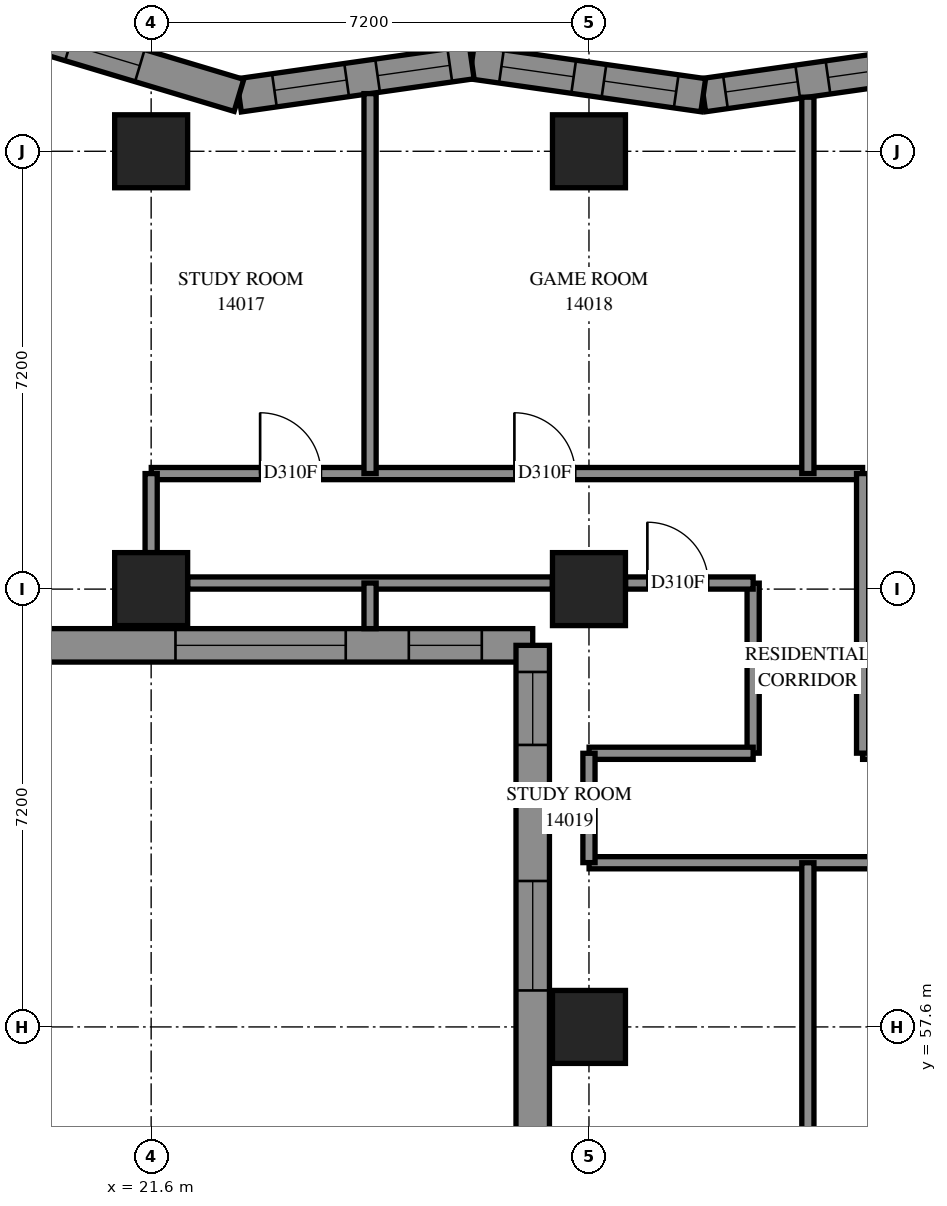
"""IFC4 building model, lengths in metres.
Left out: names, types, materials, properties, quantities, classifications, styles, units other than length and angle.
Written with IfcOpenShell. Run it as: python <this file> out.ifc"""

import sys

from ifc_helpers import new_model, si_unit, direction, frame, frame_2d, origin, origin_2d, place, context, subcontext, project, spatial, polyline, rectangle, outline, extrude, element, fill, save


model = new_model("IFC4")
c1 = context("Model", 3, precision=1e-05, world=origin(), true_north=direction((0.0, 1.0)))
c2 = subcontext(c1, "Body", "Model", "MODEL_VIEW")
j1 = project(units=[si_unit("LENGTHUNIT", "METRE"), si_unit("PLANEANGLEUNIT", "RADIAN")], contexts=[c1])
p1 = place(None, origin())
s1 = spatial("IfcSite", under=j1, at=p1, CompositionType="ELEMENT")
p2 = place(p1, origin())
s2 = spatial("IfcBuilding", under=s1, at=p2, CompositionType="ELEMENT")
p3 = place(p2, frame((0.0, 0.0, 54.2)))
s3 = spatial("IfcBuildingStorey", under=s2, at=p3, CompositionType="ELEMENT", Elevation=54.2)
for number, where, z_axis, x_axis in (
    (1, (21.6, 64.8, 0.0), (0.0, 0.0, 1.0), (1.0, 0.0, 0.0)),
    (2, (21.6, 72.0, 0.0), (0.0, 0.0, 1.0), (1.0, 0.0, 0.0)),
    (3, (28.8, 57.6, 0.0), (0.0, 0.0, 1.0), (1.0, 0.0, 0.0)),
    (4, (28.8, 64.8, 0.0), (0.0, 0.0, 1.0), (1.0, 0.0, 0.0)),
    (5, (28.8, 72.0, 0.0), (0.0, 0.0, 1.0), (1.0, 0.0, 0.0)),
):
    element("IfcColumn", number, at=place(p3, frame(where, z_axis=z_axis, x_axis=x_axis)), inside=s3, PredefinedType="COLUMN", context=c2, shape_type="SweptSolid", body=[
        extrude(rectangle(XDim=1.2, YDim=1.2, at=origin_2d()), origin(), (0.0, 0.0, 1.0), 3.1),
    ])
p4 = place(p3, frame((34.486, 73.464, 0.0), z_axis=(0.0, 0.0, 1.0), x_axis=(-0.990016994, -0.1409480459, 0.0)))
e6 = element("IfcWall", 6, at=p4, inside=s3, PredefinedType="SOLIDWALL", context=c2, shape_type="SweptSolid", body=[
    extrude(outline(polyline([(-0.039, -0.275), (3.806, -0.275), (3.885, 0.275), (0.039, 0.275), (-0.039, -0.275)])), origin(), (0.0, 0.0, 1.0), 3.1),
])
p5 = place(p4, frame((0.573, 0.0, 0.5)))
e7 = element("IfcOpeningElement", 7, at=p5, cuts=e6, PredefinedType="OPENING", context=c2, shape_type="SweptSolid", body=[
    extrude(rectangle(XDim=1.2, YDim=2.45, at=frame_2d((0.6, 1.225))), frame((0.0, 0.285, 0.0), z_axis=(0.0, -1.0, 0.0), x_axis=(1.0, 0.0, 0.0)), (0.0, 0.0, 1.0), 0.57),
])
p6 = place(p4, frame((2.276, 0.0, 0.5)))
e8 = element("IfcOpeningElement", 8, at=p6, cuts=e6, PredefinedType="OPENING", context=c2, shape_type="SweptSolid", body=[
    extrude(rectangle(XDim=1.2, YDim=2.45, at=frame_2d((0.6, 1.225))), frame((0.0, 0.285, 0.0), z_axis=(0.0, -1.0, 0.0), x_axis=(1.0, 0.0, 0.0)), (0.0, 0.0, 1.0), 0.57),
])
p7 = place(p3, frame((30.679, 72.922, 0.0), z_axis=(0.0, 0.0, 1.0), x_axis=(-0.990016994, 0.1409480459, 0.0)))
e9 = element("IfcWall", 9, at=p7, inside=s3, PredefinedType="SOLIDWALL", context=c2, shape_type="SweptSolid", body=[
    extrude(outline(polyline([(0.039, -0.275), (3.885, -0.275), (3.806, 0.275), (-0.039, 0.275), (0.039, -0.275)])), origin(), (0.0, 0.0, 1.0), 3.1),
])
p8 = place(p7, frame((0.449, 0.0, 0.5)))
e10 = element("IfcOpeningElement", 10, at=p8, cuts=e9, PredefinedType="OPENING", context=c2, shape_type="SweptSolid", body=[
    extrude(rectangle(XDim=1.2, YDim=2.45, at=frame_2d((0.6, 1.225))), frame((0.0, 0.285, 0.0), z_axis=(0.0, -1.0, 0.0), x_axis=(1.0, 0.0, 0.0)), (0.0, 0.0, 1.0), 0.57),
])
p9 = place(p7, frame((2.152, 0.0, 0.5)))
e11 = element("IfcOpeningElement", 11, at=p9, cuts=e9, PredefinedType="OPENING", context=c2, shape_type="SweptSolid", body=[
    extrude(rectangle(XDim=1.2, YDim=2.45, at=frame_2d((0.6, 1.225))), frame((0.0, 0.285, 0.0), z_axis=(0.0, -1.0, 0.0), x_axis=(1.0, 0.0, 0.0)), (0.0, 0.0, 1.0), 0.57),
])
p10 = place(p3, frame((26.872, 73.464, 0.0), z_axis=(0.0, 0.0, 1.0), x_axis=(-0.9900171381, -0.1409470338, 0.0)))
e12 = element("IfcWall", 12, at=p10, inside=s3, PredefinedType="SOLIDWALL", context=c2, shape_type="SweptSolid", body=[
    extrude(outline(polyline([(-0.039, -0.275), (3.806, -0.275), (3.927, 0.275), (0.039, 0.275), (-0.039, -0.275)])), origin(), (0.0, 0.0, 1.0), 3.1),
])
p11 = place(p10, frame((0.364, 0.0, 0.5)))
e13 = element("IfcOpeningElement", 13, at=p11, cuts=e12, PredefinedType="OPENING", context=c2, shape_type="SweptSolid", body=[
    extrude(rectangle(XDim=1.2, YDim=2.45, at=frame_2d((0.6, 1.225))), frame((0.0, 0.285, 0.0), z_axis=(0.0, -1.0, 0.0), x_axis=(1.0, 0.0, 0.0)), (0.0, 0.0, 1.0), 0.57),
])
p12 = place(p10, frame((2.078, 0.0, 0.5)))
e14 = element("IfcOpeningElement", 14, at=p12, cuts=e12, PredefinedType="OPENING", context=c2, shape_type="SweptSolid", body=[
    extrude(rectangle(XDim=1.2, YDim=2.45, at=frame_2d((0.6, 1.225))), frame((0.0, 0.285, 0.0), z_axis=(0.0, -1.0, 0.0), x_axis=(1.0, 0.0, 0.0)), (0.0, 0.0, 1.0), 0.57),
])
p13 = place(p3, frame((23.044, 72.919, 0.0), z_axis=(0.0, 0.0, 1.0), x_axis=(-0.9578315412, 0.2873303652, 0.0)))
e15 = element("IfcWall", 15, at=p13, inside=s3, PredefinedType="SOLIDWALL", context=c2, shape_type="SweptSolid", body=[
    extrude(outline(polyline([(0.06, -0.275), (4.035, -0.275), (3.296, 0.275), (-0.06, 0.275), (0.06, -0.275)])), origin(), (0.0, 0.0, 1.0), 3.1),
])
p14 = place(p13, frame((1.702, 0.0, 0.5)))
e16 = element("IfcOpeningElement", 16, at=p14, cuts=e15, PredefinedType="OPENING", context=c2, shape_type="SweptSolid", body=[
    extrude(rectangle(XDim=1.2, YDim=2.45, at=frame_2d((0.6, 1.225))), frame((0.0, 0.285, 0.0), z_axis=(0.0, -1.0, 0.0), x_axis=(1.0, 0.0, 0.0)), (0.0, 0.0, 1.0), 0.57),
])
p15 = place(p3, frame((19.533, 63.875, 0.0), z_axis=(0.0, 0.0, 1.0), x_axis=(1.0, 0.0, 0.0)))
e17 = element("IfcWall", 17, at=p15, inside=s3, PredefinedType="SOLIDWALL", context=c2, shape_type="SweptSolid", body=[
    extrude(outline(polyline([(-0.275, -0.275), (8.067, -0.275), (8.617, 0.275), (0.275, 0.275), (-0.275, -0.275)])), origin(), (0.0, 0.0, 1.0), 3.1),
])
p16 = place(p15, frame((2.467, 0.0, 0.5)))
e18 = element("IfcOpeningElement", 18, at=p16, cuts=e17, PredefinedType="OPENING", context=c2, shape_type="SweptSolid", body=[
    extrude(rectangle(XDim=2.8, YDim=2.45, at=frame_2d((1.4, 1.225))), frame((0.0, 0.285, 0.0), z_axis=(0.0, -1.0, 0.0), x_axis=(1.0, 0.0, 0.0)), (0.0, 0.0, 1.0), 0.57),
])
p17 = place(p15, frame((6.304, 0.0, 0.5)))
e19 = element("IfcOpeningElement", 19, at=p17, cuts=e17, PredefinedType="OPENING", context=c2, shape_type="SweptSolid", body=[
    extrude(rectangle(XDim=1.2, YDim=2.45, at=frame_2d((0.6, 1.225))), frame((0.0, 0.285, 0.0), z_axis=(0.0, -1.0, 0.0), x_axis=(1.0, 0.0, 0.0)), (0.0, 0.0, 1.0), 0.57),
])
p18 = place(p3, frame((27.875, 63.875, 0.0), z_axis=(0.0, 0.0, 1.0), x_axis=(0.0, -1.0, 0.0)))
e20 = element("IfcWall", 20, at=p18, inside=s3, PredefinedType="SOLIDWALL", context=c2, shape_type="SweptSolid", body=[
    extrude(outline(polyline([(0.275, -0.275), (8.617, -0.275), (8.067, 0.275), (-0.275, 0.275), (0.275, -0.275)])), origin(), (0.0, 0.0, 1.0), 3.1),
])
p19 = place(p18, frame((0.438, 0.0, 0.5)))
e21 = element("IfcOpeningElement", 21, at=p19, cuts=e20, PredefinedType="OPENING", context=c2, shape_type="SweptSolid", body=[
    extrude(rectangle(XDim=1.2, YDim=2.45, at=frame_2d((0.6, 1.225))), frame((0.0, 0.285, 0.0), z_axis=(0.0, -1.0, 0.0), x_axis=(1.0, 0.0, 0.0)), (0.0, 0.0, 1.0), 0.57),
])
p20 = place(p18, frame((3.875, 0.0, 0.7)))
e22 = element("IfcOpeningElement", 22, at=p20, cuts=e20, PredefinedType="OPENING", context=c2, shape_type="SweptSolid", body=[
    extrude(rectangle(XDim=1.8, YDim=2.2, at=frame_2d((0.9, 1.1))), frame((0.0, 0.285, 0.0), z_axis=(0.0, -1.0, 0.0), x_axis=(1.0, 0.0, 0.0)), (0.0, 0.0, 1.0), 0.57),
])
p21 = place(p3, frame((28.802, 60.3, 0.0), z_axis=(0.0, 0.0, 1.0), x_axis=(1.0, 0.0, 0.0)))
e23 = element("IfcWall", 23, at=p21, inside=s3, PredefinedType="PARTITIONING", context=c2, shape_type="SweptSolid", body=[
    extrude(rectangle(XDim=24.108, YDim=0.2, at=frame_2d((12.054, 0.0))), origin(), (0.0, 0.0, 1.0), 3.1),
])
p22 = place(p21, frame((11.323, 0.0, 0.0)))
e24 = element("IfcOpeningElement", 24, at=p22, cuts=e23, PredefinedType="OPENING", context=c2, shape_type="SweptSolid", body=[
    extrude(rectangle(XDim=1.0, YDim=2.1, at=frame_2d((0.5, 1.05))), frame((0.0, 0.11, 0.0), z_axis=(0.0, -1.0, 0.0), x_axis=(1.0, 0.0, 0.0)), (0.0, 0.0, 1.0), 0.22),
])
p23 = place(p21, frame((14.798, 0.0, 0.0)))
e25 = element("IfcOpeningElement", 25, at=p23, cuts=e23, PredefinedType="OPENING", context=c2, shape_type="SweptSolid", body=[
    extrude(rectangle(XDim=0.9, YDim=2.1, at=frame_2d((0.45, 1.05))), frame((0.0, 0.11, 0.0), z_axis=(0.0, -1.0, 0.0), x_axis=(1.0, 0.0, 0.0)), (0.0, 0.0, 1.0), 0.22),
])
p24 = place(p21, frame((18.833, 0.0, 0.0)))
e26 = element("IfcOpeningElement", 26, at=p24, cuts=e23, PredefinedType="OPENING", context=c2, shape_type="SweptSolid", body=[
    extrude(rectangle(XDim=1.0, YDim=2.1, at=frame_2d((0.5, 1.05))), frame((0.0, 0.11, 0.0), z_axis=(0.0, -1.0, 0.0), x_axis=(1.0, 0.0, 0.0)), (0.0, 0.0, 1.0), 0.22),
])
p25 = place(p21, frame((22.839, 0.0, 0.0)))
e27 = element("IfcOpeningElement", 27, at=p25, cuts=e23, PredefinedType="OPENING", context=c2, shape_type="SweptSolid", body=[
    extrude(rectangle(XDim=1.0, YDim=2.1, at=frame_2d((0.5, 1.05))), frame((0.0, 0.11, 0.0), z_axis=(0.0, -1.0, 0.0), x_axis=(1.0, 0.0, 0.0)), (0.0, 0.0, 1.0), 0.22),
])
p26 = place(p3, frame((33.3, 62.1, 0.0), z_axis=(0.0, 0.0, 1.0), x_axis=(1.0, 0.0, 0.0)))
e28 = element("IfcWall", 28, at=p26, inside=s3, PredefinedType="PARTITIONING", context=c2, shape_type="SweptSolid", body=[
    extrude(rectangle(XDim=21.2, YDim=0.2, at=frame_2d((10.6, 0.0))), origin(), (0.0, 0.0, 1.0), 3.1),
])
p27 = place(p26, frame((1.395, 0.0, 0.0)))
e29 = element("IfcOpeningElement", 29, at=p27, cuts=e28, PredefinedType="OPENING", context=c2, shape_type="SweptSolid", body=[
    extrude(rectangle(XDim=0.9, YDim=2.1, at=frame_2d((0.45, 1.05))), frame((0.0, 0.11, 0.0), z_axis=(0.0, -1.0, 0.0), x_axis=(1.0, 0.0, 0.0)), (0.0, 0.0, 1.0), 0.22),
])
p28 = place(p26, frame((8.674, 0.0, 0.0)))
e30 = element("IfcOpeningElement", 30, at=p28, cuts=e28, PredefinedType="OPENING", context=c2, shape_type="SweptSolid", body=[
    extrude(rectangle(XDim=1.0, YDim=2.1, at=frame_2d((0.5, 1.05))), frame((0.0, 0.11, 0.0), z_axis=(0.0, -1.0, 0.0), x_axis=(1.0, 0.0, 0.0)), (0.0, 0.0, 1.0), 0.22),
])
p29 = place(p26, frame((15.874, 0.0, 0.0)))
e31 = element("IfcOpeningElement", 31, at=p29, cuts=e28, PredefinedType="OPENING", context=c2, shape_type="SweptSolid", body=[
    extrude(rectangle(XDim=1.0, YDim=2.1, at=frame_2d((0.5, 1.05))), frame((0.0, 0.11, 0.0), z_axis=(0.0, -1.0, 0.0), x_axis=(1.0, 0.0, 0.0)), (0.0, 0.0, 1.0), 0.22),
])
p30 = place(p3, frame((21.602, 66.7, 0.0), z_axis=(0.0, 0.0, 1.0), x_axis=(1.0, 0.0, 0.0)))
e32 = element("IfcWall", 32, at=p30, inside=s3, PredefinedType="PARTITIONING", context=c2, shape_type="SweptSolid", body=[
    extrude(rectangle(XDim=11.698, YDim=0.2, at=frame_2d((5.849, 0.0))), origin(), (0.0, 0.0, 1.0), 3.1),
])
p31 = place(p30, frame((1.79, 0.0, 0.0)))
e33 = element("IfcOpeningElement", 33, at=p31, cuts=e32, PredefinedType="OPENING", context=c2, shape_type="SweptSolid", body=[
    extrude(rectangle(XDim=1.0, YDim=2.1, at=frame_2d((0.5, 1.05))), frame((0.0, 0.11, 0.0), z_axis=(0.0, -1.0, 0.0), x_axis=(1.0, 0.0, 0.0)), (0.0, 0.0, 1.0), 0.22),
])
p32 = place(p30, frame((5.972, 0.0, 0.0)))
e34 = element("IfcOpeningElement", 34, at=p32, cuts=e32, PredefinedType="OPENING", context=c2, shape_type="SweptSolid", body=[
    extrude(rectangle(XDim=1.0, YDim=2.1, at=frame_2d((0.5, 1.05))), frame((0.0, 0.11, 0.0), z_axis=(0.0, -1.0, 0.0), x_axis=(1.0, 0.0, 0.0)), (0.0, 0.0, 1.0), 0.22),
])
p33 = place(p3, frame((25.2, 66.7, 0.0), z_axis=(0.0, 0.0, 1.0), x_axis=(0.0, 1.0, 0.0)))
e35 = element("IfcWall", 35, at=p33, inside=s3, PredefinedType="PARTITIONING", context=c2, shape_type="SweptSolid", body=[
    extrude(rectangle(XDim=6.248, YDim=0.2, at=frame_2d((3.124, 0.0))), origin(), (0.0, 0.0, 1.0), 3.1),
])
p34 = place(p3, frame((32.4, 66.7, 0.0), z_axis=(0.0, 0.0, 1.0), x_axis=(0.0, 1.0, 0.0)))
e36 = element("IfcWall", 36, at=p34, inside=s3, PredefinedType="PARTITIONING", context=c2, shape_type="SweptSolid", body=[
    extrude(rectangle(XDim=6.189, YDim=0.2, at=frame_2d((3.095, 0.0))), origin(), (0.0, 0.0, 1.0), 3.1),
])
p35 = place(p3, frame((22.2, 64.9, 0.0), z_axis=(0.0, 0.0, 1.0), x_axis=(1.0, 0.0, 0.0)))
e37 = element("IfcWall", 37, at=p35, inside=s3, PredefinedType="PARTITIONING", context=c2, shape_type="SweptSolid", body=[
    extrude(rectangle(XDim=6.0, YDim=0.2, at=frame_2d((3.0, 0.0))), origin(), (0.0, 0.0, 1.0), 2.6),
])
p36 = place(p3, frame((33.3, 62.102, 0.0), z_axis=(0.0, 0.0, 1.0), x_axis=(0.0, 1.0, 0.0)))
e38 = element("IfcWall", 38, at=p36, inside=s3, PredefinedType="PARTITIONING", context=c2, shape_type="SweptSolid", body=[
    extrude(rectangle(XDim=4.598, YDim=0.2, at=frame_2d((2.299, 0.0))), origin(), (0.0, 0.0, 1.0), 3.1),
])
p37 = place(p3, frame((32.4, 55.808, 0.0), z_axis=(0.0, 0.0, 1.0), x_axis=(0.0, 1.0, 0.0)))
e39 = element("IfcWall", 39, at=p37, inside=s3, PredefinedType="PARTITIONING", context=c2, shape_type="SweptSolid", body=[
    extrude(rectangle(XDim=4.492, YDim=0.2, at=frame_2d((2.246, 0.0))), origin(), (0.0, 0.0, 1.0), 3.1),
])
p38 = place(p3, frame((31.5, 62.102, 0.0), z_axis=(0.0, 0.0, 1.0), x_axis=(0.0, 1.0, 0.0)))
e40 = element("IfcWall", 40, at=p38, inside=s3, PredefinedType="PARTITIONING", context=c2, shape_type="SweptSolid", body=[
    extrude(rectangle(XDim=2.796, YDim=0.2, at=frame_2d((1.398, 0.0))), origin(), (0.0, 0.0, 1.0), 3.1),
])
p39 = place(p3, frame((28.802, 62.1, 0.0), z_axis=(0.0, 0.0, 1.0), x_axis=(1.0, 0.0, 0.0)))
e41 = element("IfcWall", 41, at=p39, inside=s3, PredefinedType="PARTITIONING", context=c2, shape_type="SweptSolid", body=[
    extrude(rectangle(XDim=2.698, YDim=0.2, at=frame_2d((1.349, 0.0))), origin(), (0.0, 0.0, 1.0), 3.1),
])
p40 = place(p3, frame((29.4, 64.9, 0.0), z_axis=(0.0, 0.0, 1.0), x_axis=(1.0, 0.0, 0.0)))
e42 = element("IfcWall", 42, at=p40, inside=s3, PredefinedType="PARTITIONING", context=c2, shape_type="SweptSolid", body=[
    extrude(rectangle(XDim=2.1, YDim=0.2, at=frame_2d((1.05, 0.0))), origin(), (0.0, 0.0, 1.0), 3.1),
])
p41 = place(p40, frame((0.36, 0.0, 0.0)))
e43 = element("IfcOpeningElement", 43, at=p41, cuts=e42, PredefinedType="OPENING", context=c2, shape_type="SweptSolid", body=[
    extrude(rectangle(XDim=1.0, YDim=2.1, at=frame_2d((0.5, 1.05))), frame((0.0, 0.11, 0.0), z_axis=(0.0, -1.0, 0.0), x_axis=(1.0, 0.0, 0.0)), (0.0, 0.0, 1.0), 0.22),
])
p42 = place(p3, frame((28.8, 60.302, 0.0), z_axis=(0.0, 0.0, 1.0), x_axis=(0.0, 1.0, 0.0)))
e44 = element("IfcWall", 44, at=p42, inside=s3, PredefinedType="PARTITIONING", context=c2, shape_type="SweptSolid", body=[
    extrude(rectangle(XDim=1.798, YDim=0.2, at=frame_2d((0.899, 0.0))), origin(), (0.0, 0.0, 1.0), 2.6),
])
p43 = place(p3, frame((21.6, 65.4, 0.0), z_axis=(0.0, 0.0, 1.0), x_axis=(0.0, 1.0, 0.0)))
e45 = element("IfcWall", 45, at=p43, inside=s3, PredefinedType="PARTITIONING", context=c2, shape_type="SweptSolid", body=[
    extrude(rectangle(XDim=1.3, YDim=0.2, at=frame_2d((0.65, 0.0))), origin(), (0.0, 0.0, 1.0), 2.6),
])
p44 = place(p3, frame((25.2, 64.15, 0.0), z_axis=(0.0, 0.0, 1.0), x_axis=(0.0, 1.0, 0.0)))
e46 = element("IfcWall", 46, at=p44, inside=s3, PredefinedType="PARTITIONING", context=c2, shape_type="SweptSolid", body=[
    extrude(rectangle(XDim=0.75, YDim=0.2, at=frame_2d((0.375, 0.0))), origin(), (0.0, 0.0, 1.0), 3.1),
])
p45 = place(p3, frame((28.2, 64.9, 0.0), z_axis=(0.0, 0.0, 1.0), x_axis=(1.0, 0.0, 0.0)))
e47 = element("IfcWall", 47, at=p45, inside=s3, PredefinedType="PARTITIONING", context=c2, shape_type="SweptSolid", body=[
    extrude(rectangle(XDim=1.2, YDim=0.2, at=frame_2d((0.6, 0.0))), origin(), (0.0, 0.0, 1.0), 3.1),
])
p46 = place(p5, origin())
e48 = element("IfcWindow", 48, at=p46, inside=s3, PartitioningType="SINGLE_PANEL", PredefinedType="WINDOW", context=c2, shape_type="SweptSolid", body=[
    extrude(rectangle(XDim=1.2, YDim=2.45, at=frame_2d((0.6, 1.225))), frame((0.0, 0.155, 0.0), z_axis=(0.0, -1.0, 0.0), x_axis=(1.0, 0.0, 0.0)), (0.0, 0.0, 1.0), 0.06),
])
fill(e7, e48)
p47 = place(p6, origin())
e49 = element("IfcWindow", 49, at=p47, inside=s3, PartitioningType="SINGLE_PANEL", PredefinedType="WINDOW", context=c2, shape_type="SweptSolid", body=[
    extrude(rectangle(XDim=1.2, YDim=2.45, at=frame_2d((0.6, 1.225))), frame((0.0, 0.155, 0.0), z_axis=(0.0, -1.0, 0.0), x_axis=(1.0, 0.0, 0.0)), (0.0, 0.0, 1.0), 0.06),
])
fill(e8, e49)
p48 = place(p8, origin())
e50 = element("IfcWindow", 50, at=p48, inside=s3, PartitioningType="SINGLE_PANEL", PredefinedType="WINDOW", context=c2, shape_type="SweptSolid", body=[
    extrude(rectangle(XDim=1.2, YDim=2.45, at=frame_2d((0.6, 1.225))), frame((0.0, 0.155, 0.0), z_axis=(0.0, -1.0, 0.0), x_axis=(1.0, 0.0, 0.0)), (0.0, 0.0, 1.0), 0.06),
])
fill(e10, e50)
p49 = place(p9, origin())
e51 = element("IfcWindow", 51, at=p49, inside=s3, PartitioningType="SINGLE_PANEL", PredefinedType="WINDOW", context=c2, shape_type="SweptSolid", body=[
    extrude(rectangle(XDim=1.2, YDim=2.45, at=frame_2d((0.6, 1.225))), frame((0.0, 0.155, 0.0), z_axis=(0.0, -1.0, 0.0), x_axis=(1.0, 0.0, 0.0)), (0.0, 0.0, 1.0), 0.06),
])
fill(e11, e51)
p50 = place(p11, origin())
e52 = element("IfcWindow", 52, at=p50, inside=s3, PartitioningType="SINGLE_PANEL", PredefinedType="WINDOW", context=c2, shape_type="SweptSolid", body=[
    extrude(rectangle(XDim=1.2, YDim=2.45, at=frame_2d((0.6, 1.225))), frame((0.0, 0.155, 0.0), z_axis=(0.0, -1.0, 0.0), x_axis=(1.0, 0.0, 0.0)), (0.0, 0.0, 1.0), 0.06),
])
fill(e13, e52)
p51 = place(p12, origin())
e53 = element("IfcWindow", 53, at=p51, inside=s3, PartitioningType="SINGLE_PANEL", PredefinedType="WINDOW", context=c2, shape_type="SweptSolid", body=[
    extrude(rectangle(XDim=1.2, YDim=2.45, at=frame_2d((0.6, 1.225))), frame((0.0, 0.155, 0.0), z_axis=(0.0, -1.0, 0.0), x_axis=(1.0, 0.0, 0.0)), (0.0, 0.0, 1.0), 0.06),
])
fill(e14, e53)
p52 = place(p14, origin())
e54 = element("IfcWindow", 54, at=p52, inside=s3, PartitioningType="SINGLE_PANEL", PredefinedType="WINDOW", context=c2, shape_type="SweptSolid", body=[
    extrude(rectangle(XDim=1.2, YDim=2.45, at=frame_2d((0.6, 1.225))), frame((0.0, 0.155, 0.0), z_axis=(0.0, -1.0, 0.0), x_axis=(1.0, 0.0, 0.0)), (0.0, 0.0, 1.0), 0.06),
])
fill(e16, e54)
p53 = place(p16, origin())
e55 = element("IfcWindow", 55, at=p53, inside=s3, PartitioningType="SINGLE_PANEL", PredefinedType="WINDOW", context=c2, shape_type="SweptSolid", body=[
    extrude(rectangle(XDim=2.8, YDim=2.45, at=frame_2d((1.4, 1.225))), frame((0.0, 0.155, 0.0), z_axis=(0.0, -1.0, 0.0), x_axis=(1.0, 0.0, 0.0)), (0.0, 0.0, 1.0), 0.06),
])
fill(e18, e55)
p54 = place(p17, origin())
e56 = element("IfcWindow", 56, at=p54, inside=s3, PartitioningType="SINGLE_PANEL", PredefinedType="WINDOW", context=c2, shape_type="SweptSolid", body=[
    extrude(rectangle(XDim=1.2, YDim=2.45, at=frame_2d((0.6, 1.225))), frame((0.0, 0.155, 0.0), z_axis=(0.0, -1.0, 0.0), x_axis=(1.0, 0.0, 0.0)), (0.0, 0.0, 1.0), 0.06),
])
fill(e19, e56)
p55 = place(p19, origin())
e57 = element("IfcWindow", 57, at=p55, inside=s3, PartitioningType="SINGLE_PANEL", PredefinedType="WINDOW", context=c2, shape_type="SweptSolid", body=[
    extrude(rectangle(XDim=1.2, YDim=2.45, at=frame_2d((0.6, 1.225))), frame((0.0, 0.155, 0.0), z_axis=(0.0, -1.0, 0.0), x_axis=(1.0, 0.0, 0.0)), (0.0, 0.0, 1.0), 0.06),
])
fill(e21, e57)
p56 = place(p31, origin())
e58 = element("IfcDoor", 58, at=p56, inside=s3, OperationType="SINGLE_SWING_RIGHT", PredefinedType="DOOR", context=c2, shape_type="SweptSolid", body=[
    extrude(rectangle(XDim=1.0, YDim=2.1, at=frame_2d((0.5, 1.05))), frame((0.0, 0.025, 0.0), z_axis=(0.0, -1.0, 0.0), x_axis=(1.0, 0.0, 0.0)), (0.0, 0.0, 1.0), 0.05),
])
fill(e33, e58)
p57 = place(p32, origin())
e59 = element("IfcDoor", 59, at=p57, inside=s3, OperationType="SINGLE_SWING_LEFT", PredefinedType="DOOR", context=c2, shape_type="SweptSolid", body=[
    extrude(rectangle(XDim=1.0, YDim=2.1, at=frame_2d((0.5, 1.05))), frame((0.0, 0.025, 0.0), z_axis=(0.0, -1.0, 0.0), x_axis=(1.0, 0.0, 0.0)), (0.0, 0.0, 1.0), 0.05),
])
fill(e34, e59)
p58 = place(p41, origin())
e60 = element("IfcDoor", 60, at=p58, inside=s3, OperationType="SINGLE_SWING_RIGHT", PredefinedType="DOOR", context=c2, shape_type="SweptSolid", body=[
    extrude(rectangle(XDim=1.0, YDim=2.1, at=frame_2d((0.5, 1.05))), frame((0.0, 0.025, 0.0), z_axis=(0.0, -1.0, 0.0), x_axis=(1.0, 0.0, 0.0)), (0.0, 0.0, 1.0), 0.05),
])
fill(e43, e60)
p59 = place(p20, origin())
e61 = element("IfcWindow", 61, at=p59, inside=s3, PartitioningType="SINGLE_PANEL", PredefinedType="WINDOW", context=c2, shape_type="SweptSolid", body=[
    extrude(rectangle(XDim=1.8, YDim=2.2, at=frame_2d((0.9, 1.1))), frame((0.0, 0.155, 0.0), z_axis=(0.0, -1.0, 0.0), x_axis=(1.0, 0.0, 0.0)), (0.0, 0.0, 1.0), 0.06),
])
fill(e22, e61)
save(model, sys.argv[1])
